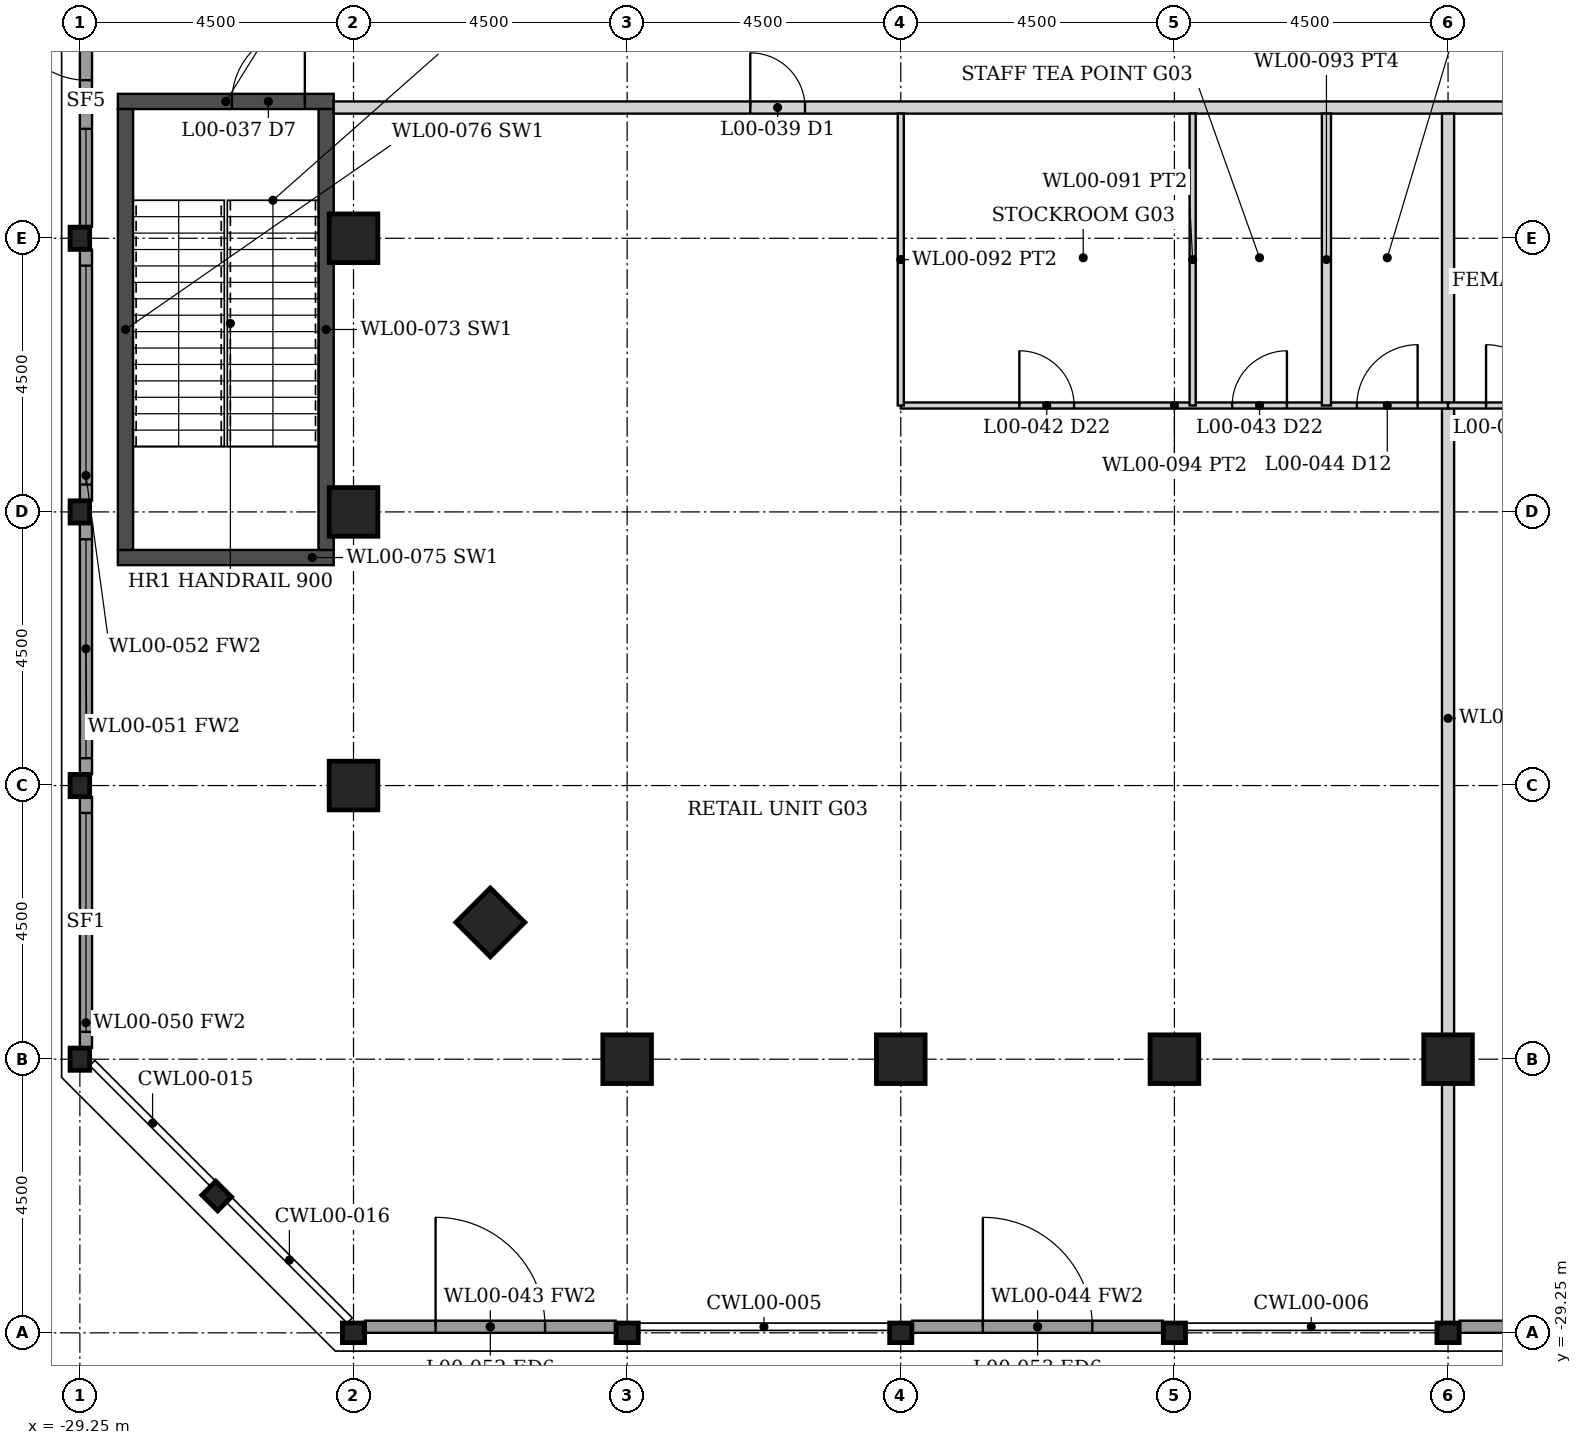
"""IFC4 building model, lengths in metres.
Left out: names, types, materials, properties, quantities, classifications, styles, units other than length and angle.
Written with IfcOpenShell. Run it as: python <this file> out.ifc"""

import sys

from ifc_helpers import new_model, si_unit, direction, frame, frame_2d, origin, origin_2d, place, context, subcontext, project, spatial, rectangle, hollow_rectangle, i_section, extrude, element, fill, save


model = new_model("IFC4")
c1 = context("Model", 3, precision=1e-05, world=origin(), true_north=direction((0.0, 1.0)))
c2 = subcontext(c1, "Body", "Model", "MODEL_VIEW")
j1 = project(units=[si_unit("LENGTHUNIT", "METRE"), si_unit("PLANEANGLEUNIT", "RADIAN")], contexts=[c1])
p1 = place(None, origin())
s1 = spatial("IfcSite", under=j1, at=p1, CompositionType="ELEMENT")
p2 = place(p1, origin())
s2 = spatial("IfcBuilding", under=s1, at=p2, CompositionType="ELEMENT")
p3 = place(p2, origin())
s3 = spatial("IfcBuildingStorey", under=s2, at=p3, CompositionType="ELEMENT", Elevation=0.0)
for number, where, z_axis, x_axis in (
    (1, (-20.25, -24.75, -0.3), (0.0, 0.0, 1.0), (0.0, 1.0, 0.0)),
    (2, (-24.75, -20.25, -0.3), (0.0, 0.0, 1.0), (1.0, 0.0, 0.0)),
    (3, (-15.75, -24.75, -0.3), (0.0, 0.0, 1.0), (0.0, 1.0, 0.0)),
    (4, (-24.75, -15.75, -0.3), (0.0, 0.0, 1.0), (1.0, 0.0, 0.0)),
    (5, (-11.25, -24.75, -0.3), (0.0, 0.0, 1.0), (0.0, 1.0, 0.0)),
    (6, (-24.75, -11.25, -0.3), (0.0, 0.0, 1.0), (1.0, 0.0, 0.0)),
    (7, (-6.75, -24.75, -0.3), (0.0, 0.0, 1.0), (0.0, 1.0, 0.0)),
    (8, (-22.5, -22.5, -0.3), (0.0, 0.0, 1.0), (0.707, 0.707, 0.0)),
):
    element("IfcColumn", number, at=place(p3, frame(where, z_axis=z_axis, x_axis=x_axis)), inside=s3, PredefinedType="COLUMN", context=c2, shape_type="SweptSolid", body=[
        extrude(hollow_rectangle(XDim=0.8, YDim=0.8, WallThickness=0.08, at=origin_2d()), origin(), (0.0, 0.0, 1.0), 6.3),
    ])
for number, where, z_axis, x_axis in (
    (9, (-24.75, -29.25, -0.3), (0.0, 0.0, 1.0), (0.0, 1.0, 0.0)),
    (10, (-29.25, -24.75, -0.3), (0.0, 0.0, 1.0), (1.0, 0.0, 0.0)),
    (11, (-20.25, -29.25, -0.3), (0.0, 0.0, 1.0), (0.0, 1.0, 0.0)),
    (12, (-29.25, -20.25, -0.3), (0.0, 0.0, 1.0), (1.0, 0.0, 0.0)),
    (13, (-15.75, -29.25, -0.3), (0.0, 0.0, 1.0), (0.0, 1.0, 0.0)),
    (14, (-29.25, -15.75, -0.3), (0.0, 0.0, 1.0), (1.0, 0.0, 0.0)),
    (15, (-11.25, -29.25, -0.3), (0.0, 0.0, 1.0), (0.0, 1.0, 0.0)),
    (16, (-29.25, -11.25, -0.3), (0.0, 0.0, 1.0), (1.0, 0.0, 0.0)),
    (17, (-6.75, -29.25, -0.3), (0.0, 0.0, 1.0), (0.0, 1.0, 0.0)),
    (18, (-27.0, -27.0, -0.3), (0.0, 0.0, 1.0), (0.707, 0.707, 0.0)),
):
    element("IfcColumn", number, at=place(p3, frame(where, z_axis=z_axis, x_axis=x_axis)), inside=s3, PredefinedType="COLUMN", context=c2, shape_type="SweptSolid", body=[
        extrude(i_section(OverallWidth=0.322, OverallDepth=0.365, WebThickness=0.027, FlangeThickness=0.044, FilletRadius=0.015, at=origin_2d()), origin(), (0.0, 0.0, 1.0), 6.3),
    ])
p4 = place(p3, frame((-28.625, -16.5, 0.0), z_axis=(0.0, 0.0, 1.0), x_axis=(1.0, 0.0, 0.0)))
e19 = element("IfcWall", 19, at=p4, inside=s3, PredefinedType="SHEAR", context=c2, shape_type="SweptSolid", body=[
    extrude(rectangle(XDim=3.55, YDim=0.25, at=frame_2d((1.775, 0.0))), origin(), (0.0, 0.0, 1.0), 6.0),
])
p5 = place(p3, frame((-28.625, -9.0, 0.0), z_axis=(0.0, 0.0, 1.0), x_axis=(1.0, 0.0, 0.0)))
e20 = element("IfcWall", 20, at=p5, inside=s3, PredefinedType="SHEAR", context=c2, shape_type="SweptSolid", body=[
    extrude(rectangle(XDim=3.55, YDim=0.25, at=frame_2d((1.775, 0.0))), origin(), (0.0, 0.0, 1.0), 6.0),
])
p6 = place(p5, frame((1.875, 0.0, 0.0)))
e21 = element("IfcOpeningElement", 21, at=p6, cuts=e20, PredefinedType="OPENING", context=c2, shape_type="SweptSolid", body=[
    extrude(rectangle(XDim=1.2, YDim=2.1, at=frame_2d((0.6, 1.05))), frame((0.0, 0.135, 0.0), z_axis=(0.0, -1.0, 0.0), x_axis=(1.0, 0.0, 0.0)), (0.0, 0.0, 1.0), 0.27),
])
for number, where, z_axis, x_axis in (
    (22, (-28.5, -16.375, 0.0), (0.0, 0.0, 1.0), (0.0, 1.0, 0.0)),
    (23, (-25.2, -16.375, 0.0), (0.0, 0.0, 1.0), (0.0, 1.0, 0.0)),
):
    element("IfcWall", number, at=place(p3, frame(where, z_axis=z_axis, x_axis=x_axis)), inside=s3, PredefinedType="SHEAR", context=c2, shape_type="SweptSolid", body=[
        extrude(rectangle(XDim=7.25, YDim=0.25, at=frame_2d((3.625, 0.0))), origin(), (0.0, 0.0, 1.0), 6.0),
    ])
p7 = place(p3, frame((-24.562, -29.15, 0.0), z_axis=(0.0, 0.0, 1.0), x_axis=(1.0, 0.0, 0.0)))
e24 = element("IfcWall", 24, at=p7, inside=s3, PredefinedType="SOLIDWALL", context=c2, shape_type="SweptSolid", body=[
    extrude(rectangle(XDim=4.125, YDim=0.2, at=frame_2d((2.062, 0.0))), origin(), (0.0, 0.0, 1.0), 5.133),
])
p8 = place(p7, frame((1.162, 0.0, 0.0)))
e25 = element("IfcOpeningElement", 25, at=p8, cuts=e24, PredefinedType="OPENING", context=c2, shape_type="SweptSolid", body=[
    extrude(rectangle(XDim=1.8, YDim=2.7, at=frame_2d((0.9, 1.35))), frame((0.0, 0.11, 0.0), z_axis=(0.0, -1.0, 0.0), x_axis=(1.0, 0.0, 0.0)), (0.0, 0.0, 1.0), 0.22),
])
p9 = place(p3, frame((-15.562, -29.15, 0.0), z_axis=(0.0, 0.0, 1.0), x_axis=(1.0, 0.0, 0.0)))
e26 = element("IfcWall", 26, at=p9, inside=s3, PredefinedType="SOLIDWALL", context=c2, shape_type="SweptSolid", body=[
    extrude(rectangle(XDim=4.125, YDim=0.2, at=frame_2d((2.062, 0.0))), origin(), (0.0, 0.0, 1.0), 5.133),
])
p10 = place(p9, frame((1.162, 0.0, 0.0)))
e27 = element("IfcOpeningElement", 27, at=p10, cuts=e26, PredefinedType="OPENING", context=c2, shape_type="SweptSolid", body=[
    extrude(rectangle(XDim=1.8, YDim=2.7, at=frame_2d((0.9, 1.35))), frame((0.0, 0.11, 0.0), z_axis=(0.0, -1.0, 0.0), x_axis=(1.0, 0.0, 0.0)), (0.0, 0.0, 1.0), 0.22),
])
p11 = place(p3, frame((-6.562, -29.15, 0.0), z_axis=(0.0, 0.0, 1.0), x_axis=(1.0, 0.0, 0.0)))
e28 = element("IfcWall", 28, at=p11, inside=s3, PredefinedType="SOLIDWALL", context=c2, shape_type="SweptSolid", body=[
    extrude(rectangle(XDim=4.125, YDim=0.2, at=frame_2d((2.062, 0.0))), origin(), (0.0, 0.0, 1.0), 5.133),
])
p12 = place(p11, frame((1.162, 0.0, 0.0)))
e29 = element("IfcOpeningElement", 29, at=p12, cuts=e28, PredefinedType="OPENING", context=c2, shape_type="SweptSolid", body=[
    extrude(rectangle(XDim=1.8, YDim=2.7, at=frame_2d((0.9, 1.35))), frame((0.0, 0.11, 0.0), z_axis=(0.0, -1.0, 0.0), x_axis=(1.0, 0.0, 0.0)), (0.0, 0.0, 1.0), 0.22),
])
p13 = place(p3, frame((-29.15, -24.562, 0.0), z_axis=(0.0, 0.0, 1.0), x_axis=(0.0, 1.0, 0.0)))
e30 = element("IfcWall", 30, at=p13, inside=s3, PredefinedType="SOLIDWALL", context=c2, shape_type="SweptSolid", body=[
    extrude(rectangle(XDim=4.125, YDim=0.2, at=frame_2d((2.062, 0.0))), origin(), (0.0, 0.0, 1.0), 5.133),
])
p14 = place(p13, frame((0.262, 0.0, 0.15)))
e31 = element("IfcOpeningElement", 31, at=p14, cuts=e30, PredefinedType="OPENING", context=c2, shape_type="SweptSolid", body=[
    extrude(rectangle(XDim=3.6, YDim=4.833, at=frame_2d((1.8, 2.417))), frame((0.0, 0.11, 0.0), z_axis=(0.0, -1.0, 0.0), x_axis=(1.0, 0.0, 0.0)), (0.0, 0.0, 1.0), 0.22),
])
p15 = place(p3, frame((-29.15, -20.062, 0.0), z_axis=(0.0, 0.0, 1.0), x_axis=(0.0, 1.0, 0.0)))
e32 = element("IfcWall", 32, at=p15, inside=s3, PredefinedType="SOLIDWALL", context=c2, shape_type="SweptSolid", body=[
    extrude(rectangle(XDim=4.125, YDim=0.2, at=frame_2d((2.062, 0.0))), origin(), (0.0, 0.0, 1.0), 5.133),
])
p16 = place(p15, frame((0.262, 0.0, 0.15)))
e33 = element("IfcOpeningElement", 33, at=p16, cuts=e32, PredefinedType="OPENING", context=c2, shape_type="SweptSolid", body=[
    extrude(rectangle(XDim=3.6, YDim=4.833, at=frame_2d((1.8, 2.417))), frame((0.0, 0.11, 0.0), z_axis=(0.0, -1.0, 0.0), x_axis=(1.0, 0.0, 0.0)), (0.0, 0.0, 1.0), 0.22),
])
p17 = place(p3, frame((-29.15, -15.562, 0.0), z_axis=(0.0, 0.0, 1.0), x_axis=(0.0, 1.0, 0.0)))
e34 = element("IfcWall", 34, at=p17, inside=s3, PredefinedType="SOLIDWALL", context=c2, shape_type="SweptSolid", body=[
    extrude(rectangle(XDim=4.125, YDim=0.2, at=frame_2d((2.062, 0.0))), origin(), (0.0, 0.0, 1.0), 5.133),
])
p18 = place(p17, frame((0.262, 0.0, 0.15)))
e35 = element("IfcOpeningElement", 35, at=p18, cuts=e34, PredefinedType="OPENING", context=c2, shape_type="SweptSolid", body=[
    extrude(rectangle(XDim=3.6, YDim=4.833, at=frame_2d((1.8, 2.417))), frame((0.0, 0.11, 0.0), z_axis=(0.0, -1.0, 0.0), x_axis=(1.0, 0.0, 0.0)), (0.0, 0.0, 1.0), 0.22),
])
p19 = place(p3, frame((-29.15, -11.062, 0.0), z_axis=(0.0, 0.0, 1.0), x_axis=(0.0, 1.0, 0.0)))
e36 = element("IfcWall", 36, at=p19, inside=s3, PredefinedType="SOLIDWALL", context=c2, shape_type="SweptSolid", body=[
    extrude(rectangle(XDim=4.125, YDim=0.2, at=frame_2d((2.062, 0.0))), origin(), (0.0, 0.0, 1.0), 5.133),
])
p20 = place(p19, frame((2.412, 0.0, 0.0)))
e37 = element("IfcOpeningElement", 37, at=p20, cuts=e36, PredefinedType="OPENING", context=c2, shape_type="SweptSolid", body=[
    extrude(rectangle(XDim=1.2, YDim=2.4, at=frame_2d((0.6, 1.2))), frame((0.0, 0.11, 0.0), z_axis=(0.0, -1.0, 0.0), x_axis=(1.0, 0.0, 0.0)), (0.0, 0.0, 1.0), 0.22),
])
p21 = place(p19, frame((0.012, 0.0, 0.15)))
e38 = element("IfcOpeningElement", 38, at=p21, cuts=e36, PredefinedType="OPENING", context=c2, shape_type="SweptSolid", body=[
    extrude(rectangle(XDim=1.6, YDim=4.833, at=frame_2d((0.8, 2.417))), frame((0.0, 0.11, 0.0), z_axis=(0.0, -1.0, 0.0), x_axis=(1.0, 0.0, 0.0)), (0.0, 0.0, 1.0), 0.22),
])
p22 = place(p3, frame((-25.075, -9.1, 0.0), z_axis=(0.0, 0.0, 1.0), x_axis=(1.0, 0.0, 0.0)))
e39 = element("IfcWall", 39, at=p22, inside=s3, PredefinedType="PARTITIONING", context=c2, shape_type="SweptSolid", body=[
    extrude(rectangle(XDim=50.15, YDim=0.2, at=frame_2d((25.075, 0.0))), origin(), (0.0, 0.0, 1.0), 4.829),
])
p23 = place(p22, frame((6.85, 0.0, 0.0)))
e40 = element("IfcOpeningElement", 40, at=p23, cuts=e39, PredefinedType="OPENING", context=c2, shape_type="SweptSolid", body=[
    extrude(rectangle(XDim=0.9, YDim=2.1, at=frame_2d((0.45, 1.05))), frame((0.0, 0.11, 0.0), z_axis=(0.0, -1.0, 0.0), x_axis=(1.0, 0.0, 0.0)), (0.0, 0.0, 1.0), 0.22),
])
p24 = place(p22, frame((24.625, 0.0, 0.0)))
e41 = element("IfcOpeningElement", 41, at=p24, cuts=e39, PredefinedType="OPENING", context=c2, shape_type="SweptSolid", body=[
    extrude(rectangle(XDim=0.9, YDim=2.1, at=frame_2d((0.45, 1.05))), frame((0.0, 0.11, 0.0), z_axis=(0.0, -1.0, 0.0), x_axis=(1.0, 0.0, 0.0)), (0.0, 0.0, 1.0), 0.22),
])
p25 = place(p22, frame((42.4, 0.0, 0.0)))
e42 = element("IfcOpeningElement", 42, at=p25, cuts=e39, PredefinedType="OPENING", context=c2, shape_type="SweptSolid", body=[
    extrude(rectangle(XDim=0.9, YDim=2.1, at=frame_2d((0.45, 1.05))), frame((0.0, 0.11, 0.0), z_axis=(0.0, -1.0, 0.0), x_axis=(1.0, 0.0, 0.0)), (0.0, 0.0, 1.0), 0.22),
])
p26 = place(p3, frame((-6.75, -29.089, 0.0), z_axis=(0.0, 0.0, 1.0), x_axis=(0.0, 1.0, 0.0)))
e43 = element("IfcWall", 43, at=p26, inside=s3, PredefinedType="PARTITIONING", context=c2, shape_type="SweptSolid", body=[
    extrude(rectangle(XDim=19.889, YDim=0.2, at=frame_2d((9.944, 0.0))), origin(), (0.0, 0.0, 1.0), 4.829),
])
p27 = place(p3, frame((-15.75, -14.0, 0.0), z_axis=(0.0, 0.0, 1.0), x_axis=(1.0, 0.0, 0.0)))
e44 = element("IfcWall", 44, at=p27, inside=s3, PredefinedType="PARTITIONING", context=c2, shape_type="SweptSolid", body=[
    extrude(rectangle(XDim=9.0, YDim=0.1, at=frame_2d((4.5, 0.0))), origin(), (0.0, 0.0, 1.0), 4.829),
])
p28 = place(p27, frame((1.95, 0.0, 0.0)))
e45 = element("IfcOpeningElement", 45, at=p28, cuts=e44, PredefinedType="OPENING", context=c2, shape_type="SweptSolid", body=[
    extrude(rectangle(XDim=0.9, YDim=2.1, at=frame_2d((0.45, 1.05))), frame((0.0, 0.06, 0.0), z_axis=(0.0, -1.0, 0.0), x_axis=(1.0, 0.0, 0.0)), (0.0, 0.0, 1.0), 0.12),
])
p29 = place(p27, frame((5.45, 0.0, 0.0)))
e46 = element("IfcOpeningElement", 46, at=p29, cuts=e44, PredefinedType="OPENING", context=c2, shape_type="SweptSolid", body=[
    extrude(rectangle(XDim=0.9, YDim=2.1, at=frame_2d((0.45, 1.05))), frame((0.0, 0.06, 0.0), z_axis=(0.0, -1.0, 0.0), x_axis=(1.0, 0.0, 0.0)), (0.0, 0.0, 1.0), 0.12),
])
p30 = place(p27, frame((7.5, 0.0, 0.0)))
e47 = element("IfcOpeningElement", 47, at=p30, cuts=e44, PredefinedType="OPENING", context=c2, shape_type="SweptSolid", body=[
    extrude(rectangle(XDim=1.0, YDim=2.1, at=frame_2d((0.5, 1.05))), frame((0.0, 0.06, 0.0), z_axis=(0.0, -1.0, 0.0), x_axis=(1.0, 0.0, 0.0)), (0.0, 0.0, 1.0), 0.12),
])
for number, where, z_axis, x_axis in (
    (48, (-15.75, -14.0, 0.0), (0.0, 0.0, 1.0), (0.0, 1.0, 0.0)),
    (49, (-10.95, -14.0, 0.0), (0.0, 0.0, 1.0), (0.0, 1.0, 0.0)),
):
    element("IfcWall", number, at=place(p3, frame(where, z_axis=z_axis, x_axis=x_axis)), inside=s3, PredefinedType="PARTITIONING", context=c2, shape_type="SweptSolid", body=[
        extrude(rectangle(XDim=4.8, YDim=0.1, at=frame_2d((2.4, 0.0))), origin(), (0.0, 0.0, 1.0), 4.829),
    ])
p31 = place(p3, frame((-8.75, -14.0, 0.0), z_axis=(0.0, 0.0, 1.0), x_axis=(0.0, 1.0, 0.0)))
e50 = element("IfcWall", 50, at=p31, inside=s3, PredefinedType="PARTITIONING", context=c2, shape_type="SweptSolid", body=[
    extrude(rectangle(XDim=4.8, YDim=0.15, at=frame_2d((2.4, 0.0))), origin(), (0.0, 0.0, 1.0), 4.829),
])
p32 = place(p3, frame((-6.75, -14.0, 0.0), z_axis=(0.0, 0.0, 1.0), x_axis=(1.0, 0.0, 0.0)))
e51 = element("IfcWall", 51, at=p32, inside=s3, PredefinedType="PARTITIONING", context=c2, shape_type="SweptSolid", body=[
    extrude(rectangle(XDim=4.5, YDim=0.1, at=frame_2d((2.25, 0.0))), origin(), (0.0, 0.0, 1.0), 4.829),
])
p33 = place(p32, frame((0.625, 0.0, 0.0)))
e52 = element("IfcOpeningElement", 52, at=p33, cuts=e51, PredefinedType="OPENING", context=c2, shape_type="SweptSolid", body=[
    extrude(rectangle(XDim=1.0, YDim=2.1, at=frame_2d((0.5, 1.05))), frame((0.0, 0.06, 0.0), z_axis=(0.0, -1.0, 0.0), x_axis=(1.0, 0.0, 0.0)), (0.0, 0.0, 1.0), 0.12),
])
p34 = place(p32, frame((2.875, 0.0, 0.0)))
e53 = element("IfcOpeningElement", 53, at=p34, cuts=e51, PredefinedType="OPENING", context=c2, shape_type="SweptSolid", body=[
    extrude(rectangle(XDim=1.0, YDim=2.1, at=frame_2d((0.5, 1.05))), frame((0.0, 0.06, 0.0), z_axis=(0.0, -1.0, 0.0), x_axis=(1.0, 0.0, 0.0)), (0.0, 0.0, 1.0), 0.12),
])
p35 = place(p8, origin())
e54 = element("IfcDoor", 54, at=p35, inside=s3, OperationType="DOUBLE_DOOR_SINGLE_SWING", PredefinedType="DOOR", context=c2, shape_type="SweptSolid", body=[
    extrude(rectangle(XDim=1.8, YDim=2.7, at=frame_2d((0.9, 1.35))), frame((0.0, 0.025, 0.0), z_axis=(0.0, -1.0, 0.0), x_axis=(1.0, 0.0, 0.0)), (0.0, 0.0, 1.0), 0.05),
])
fill(e25, e54)
p36 = place(p10, origin())
e55 = element("IfcDoor", 55, at=p36, inside=s3, OperationType="DOUBLE_DOOR_SINGLE_SWING", PredefinedType="DOOR", context=c2, shape_type="SweptSolid", body=[
    extrude(rectangle(XDim=1.8, YDim=2.7, at=frame_2d((0.9, 1.35))), frame((0.0, 0.025, 0.0), z_axis=(0.0, -1.0, 0.0), x_axis=(1.0, 0.0, 0.0)), (0.0, 0.0, 1.0), 0.05),
])
fill(e27, e55)
p37 = place(p14, origin())
e56 = element("IfcWindow", 56, at=p37, inside=s3, PartitioningType="SINGLE_PANEL", PredefinedType="WINDOW", context=c2, shape_type="SweptSolid", body=[
    extrude(rectangle(XDim=3.6, YDim=4.833, at=frame_2d((1.8, 2.417))), frame((0.0, 0.03, 0.0), z_axis=(0.0, -1.0, 0.0), x_axis=(1.0, 0.0, 0.0)), (0.0, 0.0, 1.0), 0.06),
])
fill(e31, e56)
p38 = place(p16, origin())
e57 = element("IfcWindow", 57, at=p38, inside=s3, PartitioningType="SINGLE_PANEL", PredefinedType="WINDOW", context=c2, shape_type="SweptSolid", body=[
    extrude(rectangle(XDim=3.6, YDim=4.833, at=frame_2d((1.8, 2.417))), frame((0.0, 0.03, 0.0), z_axis=(0.0, -1.0, 0.0), x_axis=(1.0, 0.0, 0.0)), (0.0, 0.0, 1.0), 0.06),
])
fill(e33, e57)
p39 = place(p18, origin())
e58 = element("IfcWindow", 58, at=p39, inside=s3, PartitioningType="SINGLE_PANEL", PredefinedType="WINDOW", context=c2, shape_type="SweptSolid", body=[
    extrude(rectangle(XDim=3.6, YDim=4.833, at=frame_2d((1.8, 2.417))), frame((0.0, 0.03, 0.0), z_axis=(0.0, -1.0, 0.0), x_axis=(1.0, 0.0, 0.0)), (0.0, 0.0, 1.0), 0.06),
])
fill(e35, e58)
p40 = place(p20, origin())
e59 = element("IfcDoor", 59, at=p40, inside=s3, OperationType="SINGLE_SWING_RIGHT", PredefinedType="DOOR", context=c2, shape_type="SweptSolid", body=[
    extrude(rectangle(XDim=1.2, YDim=2.4, at=frame_2d((0.6, 1.2))), frame((0.0, 0.025, 0.0), z_axis=(0.0, -1.0, 0.0), x_axis=(1.0, 0.0, 0.0)), (0.0, 0.0, 1.0), 0.05),
])
fill(e37, e59)
p41 = place(p21, origin())
e60 = element("IfcWindow", 60, at=p41, inside=s3, PartitioningType="SINGLE_PANEL", PredefinedType="WINDOW", context=c2, shape_type="SweptSolid", body=[
    extrude(rectangle(XDim=1.6, YDim=4.833, at=frame_2d((0.8, 2.417))), frame((0.0, 0.03, 0.0), z_axis=(0.0, -1.0, 0.0), x_axis=(1.0, 0.0, 0.0)), (0.0, 0.0, 1.0), 0.06),
])
fill(e38, e60)
p42 = place(p28, origin())
e61 = element("IfcDoor", 61, at=p42, inside=s3, OperationType="SINGLE_SWING_LEFT", PredefinedType="DOOR", context=c2, shape_type="SweptSolid", body=[
    extrude(rectangle(XDim=0.9, YDim=2.1, at=frame_2d((0.45, 1.05))), frame((0.0, 0.025, 0.0), z_axis=(0.0, -1.0, 0.0), x_axis=(1.0, 0.0, 0.0)), (0.0, 0.0, 1.0), 0.05),
])
fill(e45, e61)
p43 = place(p29, origin())
e62 = element("IfcDoor", 62, at=p43, inside=s3, OperationType="SINGLE_SWING_RIGHT", PredefinedType="DOOR", context=c2, shape_type="SweptSolid", body=[
    extrude(rectangle(XDim=0.9, YDim=2.1, at=frame_2d((0.45, 1.05))), frame((0.0, 0.025, 0.0), z_axis=(0.0, -1.0, 0.0), x_axis=(1.0, 0.0, 0.0)), (0.0, 0.0, 1.0), 0.05),
])
fill(e46, e62)
p44 = place(p30, origin())
e63 = element("IfcDoor", 63, at=p44, inside=s3, OperationType="SINGLE_SWING_RIGHT", PredefinedType="DOOR", context=c2, shape_type="SweptSolid", body=[
    extrude(rectangle(XDim=1.0, YDim=2.1, at=frame_2d((0.5, 1.05))), frame((0.0, 0.025, 0.0), z_axis=(0.0, -1.0, 0.0), x_axis=(1.0, 0.0, 0.0)), (0.0, 0.0, 1.0), 0.05),
])
fill(e47, e63)
p45 = place(p23, origin())
e64 = element("IfcDoor", 64, at=p45, inside=s3, OperationType="SINGLE_SWING_LEFT", PredefinedType="DOOR", context=c2, shape_type="SweptSolid", body=[
    extrude(rectangle(XDim=0.9, YDim=2.1, at=frame_2d((0.45, 1.05))), frame((0.0, 0.025, 0.0), z_axis=(0.0, -1.0, 0.0), x_axis=(1.0, 0.0, 0.0)), (0.0, 0.0, 1.0), 0.05),
])
fill(e40, e64)
p46 = place(p33, origin())
e65 = element("IfcDoor", 65, at=p46, inside=s3, OperationType="SINGLE_SWING_LEFT", PredefinedType="DOOR", context=c2, shape_type="SweptSolid", body=[
    extrude(rectangle(XDim=1.0, YDim=2.1, at=frame_2d((0.5, 1.05))), frame((0.0, 0.025, 0.0), z_axis=(0.0, -1.0, 0.0), x_axis=(1.0, 0.0, 0.0)), (0.0, 0.0, 1.0), 0.05),
])
fill(e52, e65)
p47 = place(p6, origin())
e66 = element("IfcDoor", 66, at=p47, inside=s3, OperationType="SINGLE_SWING_RIGHT", PredefinedType="DOOR", context=c2, shape_type="SweptSolid", body=[
    extrude(rectangle(XDim=1.2, YDim=2.1, at=frame_2d((0.6, 1.05))), frame((0.0, 0.025, 0.0), z_axis=(0.0, -1.0, 0.0), x_axis=(1.0, 0.0, 0.0)), (0.0, 0.0, 1.0), 0.05),
])
fill(e21, e66)
save(model, sys.argv[1])
